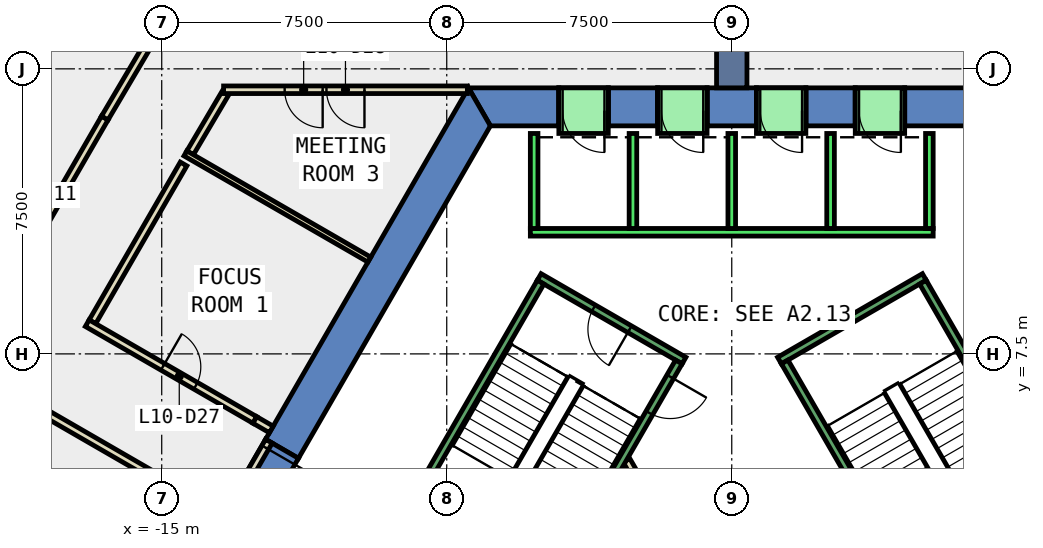
"""IFC4 building model, lengths in metres.
Left out: names, types, materials, properties, quantities, classifications, styles, units other than length and angle.
Written with IfcOpenShell. Run it as: python <this file> out.ifc"""

import sys

from ifc_helpers import new_model, si_unit, direction, frame, frame_2d, origin, place, context, subcontext, project, spatial, polyline, rectangle, outline, extrude, element, fill, save


model = new_model("IFC4")
c1 = context("Model", 3, precision=1e-05, world=origin(), true_north=direction((0.0, 1.0)))
c2 = subcontext(c1, "Body", "Model", "MODEL_VIEW")
j1 = project(units=[si_unit("LENGTHUNIT", "METRE"), si_unit("PLANEANGLEUNIT", "RADIAN")], contexts=[c1])
p1 = place(None, origin())
s1 = spatial("IfcSite", under=j1, at=p1, CompositionType="ELEMENT")
p2 = place(p1, origin())
s2 = spatial("IfcBuilding", under=s1, at=p2, CompositionType="ELEMENT")
p3 = place(p2, frame((0.0, 0.0, 51.8)))
s3 = spatial("IfcBuildingStorey", under=s2, at=p3, CompositionType="ELEMENT", Elevation=51.8)
p4 = place(p3, frame((0.0, 0.0, -0.4)))
e1 = element("IfcWall", 1, at=p4, inside=s3, PredefinedType="SHEAR", context=c2, shape_type="SweptSolid", body=[
    extrude(outline(polyline([(4.55, 14.5), (4.55, 13.5), (6.351, 13.5), (6.928, 14.5), (4.55, 14.5)])), origin(), (0.0, 0.0, 1.0), 4.2),
])
p5 = place(p3, frame((0.0, 0.0, -0.4)))
e2 = element("IfcWall", 2, at=p5, inside=s3, PredefinedType="SHEAR", context=c2, shape_type="SweptSolid", body=[
    extrude(outline(polyline([(1.95, 14.5), (1.95, 13.5), (3.25, 13.5), (3.25, 14.5), (1.95, 14.5)])), origin(), (0.0, 0.0, 1.0), 4.2),
])
p6 = place(p3, frame((0.0, 0.0, -0.4)))
e3 = element("IfcWall", 3, at=p6, inside=s3, PredefinedType="SHEAR", context=c2, shape_type="SweptSolid", body=[
    extrude(outline(polyline([(-0.65, 14.5), (-0.65, 13.5), (0.65, 13.5), (0.65, 14.5), (-0.65, 14.5)])), origin(), (0.0, 0.0, 1.0), 4.2),
])
p7 = place(p3, frame((0.0, 0.0, -0.4)))
e4 = element("IfcWall", 4, at=p7, inside=s3, PredefinedType="SHEAR", context=c2, shape_type="SweptSolid", body=[
    extrude(outline(polyline([(-3.25, 14.5), (-3.25, 13.5), (-1.95, 13.5), (-1.95, 14.5), (-3.25, 14.5)])), origin(), (0.0, 0.0, 1.0), 4.2),
])
p8 = place(p3, frame((0.0, 0.0, -0.4)))
e5 = element("IfcWall", 5, at=p8, inside=s3, PredefinedType="SHEAR", context=c2, shape_type="SweptSolid", body=[
    extrude(outline(polyline([(-4.55, 13.5), (-4.55, 14.5), (-6.928, 14.5), (-6.351, 13.5), (-4.55, 13.5)])), origin(), (0.0, 0.0, 1.0), 4.2),
])
p9 = place(p3, frame((0.0, 0.0, 3.6)))
e6 = element("IfcWall", 6, at=p9, inside=s3, PredefinedType="SHEAR", context=c2, shape_type="SweptSolid", body=[
    extrude(outline(polyline([(3.25, 14.5), (3.25, 13.5), (4.55, 13.5), (4.55, 14.5), (3.25, 14.5)])), origin(), (0.0, 0.0, 1.0), 0.2),
])
p10 = place(p3, frame((0.0, 0.0, 3.6)))
e7 = element("IfcWall", 7, at=p10, inside=s3, PredefinedType="SHEAR", context=c2, shape_type="SweptSolid", body=[
    extrude(outline(polyline([(0.65, 14.5), (0.65, 13.5), (1.95, 13.5), (1.95, 14.5), (0.65, 14.5)])), origin(), (0.0, 0.0, 1.0), 0.2),
])
p11 = place(p3, frame((0.0, 0.0, 3.6)))
e8 = element("IfcWall", 8, at=p11, inside=s3, PredefinedType="SHEAR", context=c2, shape_type="SweptSolid", body=[
    extrude(outline(polyline([(-1.95, 14.5), (-1.95, 13.5), (-0.65, 13.5), (-0.65, 14.5), (-1.95, 14.5)])), origin(), (0.0, 0.0, 1.0), 0.2),
])
p12 = place(p3, frame((0.0, 0.0, 3.6)))
e9 = element("IfcWall", 9, at=p12, inside=s3, PredefinedType="SHEAR", context=c2, shape_type="SweptSolid", body=[
    extrude(outline(polyline([(-4.55, 14.5), (-4.55, 13.5), (-3.25, 13.5), (-3.25, 14.5), (-4.55, 14.5)])), origin(), (0.0, 0.0, 1.0), 0.2),
])
p13 = place(p3, frame((0.0, 0.0, -0.4)))
e10 = element("IfcWall", 10, at=p13, inside=s3, PredefinedType="SHEAR", context=c2, shape_type="SweptSolid", body=[
    extrude(outline(polyline([(-12.267, 5.252), (-11.402, 4.752), (-6.351, 13.5), (-6.928, 14.5), (-12.267, 5.252)])), origin(), (0.0, 0.0, 1.0), 4.2),
])
p14 = place(p3, frame((0.0, 0.0, 3.6)))
e11 = element("IfcWall", 11, at=p14, inside=s3, PredefinedType="SHEAR", context=c2, shape_type="SweptSolid", body=[
    extrude(outline(polyline([(-13.267, 3.52), (-12.402, 3.02), (-11.402, 4.752), (-12.267, 5.252), (-13.267, 3.52)])), origin(), (0.0, 0.0, 1.0), 0.2),
])
p15 = place(p3, frame((0.0, 14.5, -0.4), z_axis=(0.0, 0.0, 1.0), x_axis=(0.0, 1.0, 0.0)))
e12 = element("IfcWall", 12, at=p15, inside=s3, PredefinedType="SHEAR", context=c2, shape_type="SweptSolid", body=[
    extrude(rectangle(XDim=9.0, YDim=0.8, at=frame_2d((4.5, 0.0))), origin(), (0.0, 0.0, 1.0), 4.2),
])
p16 = place(p3, frame((-14.425, 12.497, 0.0), z_axis=(0.0, 0.0, 1.0), x_axis=(-0.500026519606, -0.866010092142, 0.0)))
e13 = element("IfcWall", 13, at=p16, inside=s3, PredefinedType="PARTITIONING", context=c2, shape_type="SweptSolid", body=[
    extrude(rectangle(XDim=4.796, YDim=0.2, at=frame_2d((2.398, 0.0))), origin(), (0.0, 0.0, 1.0), 3.8),
])
p17 = place(p3, frame((-16.96, 8.308, 0.0), z_axis=(0.0, 0.0, 1.0), x_axis=(0.866018717003, -0.500011581666, 0.0)))
e14 = element("IfcWall", 14, at=p17, inside=s3, PredefinedType="PARTITIONING", context=c2, shape_type="SweptSolid", body=[
    extrude(rectangle(XDim=5.092, YDim=0.2, at=frame_2d((2.546, 0.0))), origin(), (0.0, 0.0, 1.0), 3.8),
])
p18 = place(p17, frame((2.296, 0.0, 0.0)))
e15 = element("IfcOpeningElement", 15, at=p18, cuts=e14, PredefinedType="OPENING", context=c2, shape_type="SweptSolid", body=[
    extrude(rectangle(XDim=1.0, YDim=2.1, at=frame_2d((0.5, 1.05))), frame((0.0, 0.11, 0.0), z_axis=(0.0, -1.0, 0.0), x_axis=(1.0, 0.0, 0.0)), (0.0, 0.0, 1.0), 0.22),
])
p19 = place(p3, frame((-13.323, 14.364, 0.0), z_axis=(0.0, 0.0, 1.0), x_axis=(-0.508274698505, -0.861195001646, 0.0)))
e16 = element("IfcWall", 16, at=p19, inside=s3, PredefinedType="PARTITIONING", context=c2, shape_type="SweptSolid", body=[
    extrude(rectangle(XDim=1.828, YDim=0.2, at=frame_2d((0.914, 0.0))), origin(), (0.0, 0.0, 1.0), 3.8),
])
p20 = place(p3, frame((-20.12, 7.434, 0.0), z_axis=(0.0, 0.0, 1.0), x_axis=(0.500039488902, 0.866002603656, 0.0)))
e17 = element("IfcWall", 17, at=p20, inside=s3, PredefinedType="PARTITIONING", context=c2, shape_type="SweptSolid", body=[
    extrude(rectangle(XDim=7.244, YDim=0.2, at=frame_2d((3.622, 0.0))), origin(), (0.0, 0.0, 1.0), 3.8),
])
p21 = place(p20, frame((3.122, 0.0, 0.0)))
e18 = element("IfcOpeningElement", 18, at=p21, cuts=e17, PredefinedType="OPENING", context=c2, shape_type="SweptSolid", body=[
    extrude(rectangle(XDim=1.0, YDim=2.1, at=frame_2d((0.5, 1.05))), frame((0.0, 0.11, 0.0), z_axis=(0.0, -1.0, 0.0), x_axis=(1.0, 0.0, 0.0)), (0.0, 0.0, 1.0), 0.22),
])
p22 = place(p3, frame((-16.498, 13.707, 0.0), z_axis=(0.0, 0.0, 1.0), x_axis=(0.508471945541, 0.861078556578, 0.0)))
e19 = element("IfcWall", 19, at=p22, inside=s3, PredefinedType="PARTITIONING", context=c2, shape_type="SweptSolid", body=[
    extrude(rectangle(XDim=3.548, YDim=0.2, at=frame_2d((1.774, 0.0))), origin(), (0.0, 0.0, 1.0), 3.8),
])
p23 = place(p3, frame((-14.377, 12.775, 0.0), z_axis=(0.0, 0.0, 1.0), x_axis=(0.866051730117, -0.499954398681, 0.0)))
e20 = element("IfcWall", 20, at=p23, inside=s3, PredefinedType="PARTITIONING", context=c2, shape_type="SweptSolid", body=[
    extrude(rectangle(XDim=5.588, YDim=0.15, at=frame_2d((2.794, 0.0))), origin(), (0.0, 0.0, 1.0), 3.8),
])
p24 = place(p3, frame((-6.957, 14.45, 0.0), z_axis=(0.0, 0.0, 1.0), x_axis=(-1.0, 0.0, 0.0)))
e21 = element("IfcWall", 21, at=p24, inside=s3, PredefinedType="PARTITIONING", context=c2, shape_type="SweptSolid", body=[
    extrude(rectangle(XDim=6.415, YDim=0.2, at=frame_2d((3.208, 0.0))), origin(), (0.0, 0.0, 1.0), 3.8),
])
p25 = place(p24, frame((2.708, 0.0, 0.0)))
e22 = element("IfcOpeningElement", 22, at=p25, cuts=e21, PredefinedType="OPENING", context=c2, shape_type="SweptSolid", body=[
    extrude(rectangle(XDim=1.0, YDim=2.1, at=frame_2d((0.5, 1.05))), frame((0.0, 0.11, 0.0), z_axis=(0.0, -1.0, 0.0), x_axis=(1.0, 0.0, 0.0)), (0.0, 0.0, 1.0), 0.22),
])
p26 = place(p24, frame((3.808, 0.0, 0.0)))
e23 = element("IfcOpeningElement", 23, at=p26, cuts=e21, PredefinedType="OPENING", context=c2, shape_type="SweptSolid", body=[
    extrude(rectangle(XDim=1.0, YDim=2.1, at=frame_2d((0.5, 1.05))), frame((0.0, 0.11, 0.0), z_axis=(0.0, -1.0, 0.0), x_axis=(1.0, 0.0, 0.0)), (0.0, 0.0, 1.0), 0.22),
])
p27 = place(p3, frame((-2.771, 4.7, 0.0), z_axis=(0.0, 0.0, 1.0), x_axis=(0.499969479948, -0.866043023828, 0.0)))
e24 = element("IfcWall", 24, at=p27, inside=s3, PredefinedType="PARTITIONING", context=c2, shape_type="SweptSolid", body=[
    extrude(rectangle(XDim=4.99, YDim=0.2, at=frame_2d((2.495, 0.0))), origin(), (0.0, 0.0, 1.0), 3.8),
])
p28 = place(p27, frame((1.945, 0.0, 0.0)))
e25 = element("IfcOpeningElement", 25, at=p28, cuts=e24, PredefinedType="OPENING", context=c2, shape_type="SweptSolid", body=[
    extrude(rectangle(XDim=1.0, YDim=2.1, at=frame_2d((0.5, 1.05))), frame((0.0, 0.11, 0.0), z_axis=(0.0, -1.0, 0.0), x_axis=(1.0, 0.0, 0.0)), (0.0, 0.0, 1.0), 0.22),
])
p29 = place(p3, frame((-12.18, 5.202, 0.0), z_axis=(0.0, 0.0, 1.0), x_axis=(-0.50002537861, -0.866010750942, 0.0)))
e26 = element("IfcWall", 26, at=p29, inside=s3, PredefinedType="PARTITIONING", context=c2, shape_type="SweptSolid", body=[
    extrude(rectangle(XDim=2.0, YDim=0.2, at=frame_2d((1.0, 0.0))), origin(), (0.0, 0.0, 1.0), 2.4),
])
p30 = place(p29, frame((0.19, 0.0, 0.0)))
e27 = element("IfcOpeningElement", 27, at=p30, cuts=e26, PredefinedType="OPENING", context=c2, shape_type="SweptSolid", body=[
    extrude(rectangle(XDim=1.8, YDim=2.1, at=frame_2d((0.9, 1.05))), frame((0.0, 0.11, 0.0), z_axis=(0.0, -1.0, 0.0), x_axis=(1.0, 0.0, 0.0)), (0.0, 0.0, 1.0), 0.22),
])
p31 = place(p3, frame((-12.55, 5.762, 0.0), z_axis=(0.0, 0.0, 1.0), x_axis=(0.866071776036, -0.499919672301, 0.0)))
e28 = element("IfcWall", 28, at=p31, inside=s3, PredefinedType="PARTITIONING", context=c2, shape_type="SweptSolid", body=[
    extrude(rectangle(XDim=0.5, YDim=0.2, at=frame_2d((0.25, 0.0))), origin(), (0.0, 0.0, 1.0), 2.4),
])
p32 = place(p3, frame((-13.85, 3.51, 0.0), z_axis=(0.0, 0.0, 1.0), x_axis=(-0.865969361037, 0.500097056325, 0.0)))
e29 = element("IfcWall", 29, at=p32, inside=s3, PredefinedType="PARTITIONING", context=c2, shape_type="SweptSolid", body=[
    extrude(rectangle(XDim=4.889, YDim=0.2, at=frame_2d((2.445, 0.0))), origin(), (0.0, 0.0, 1.0), 3.8),
])
p33 = place(p3, frame((5.3, 10.7, 0.0), z_axis=(0.0, 0.0, 1.0), x_axis=(-1.0, 0.0, 0.0)))
e30 = element("IfcWall", 30, at=p33, inside=s3, PredefinedType="STANDARD", context=c2, shape_type="SweptSolid", body=[
    extrude(rectangle(XDim=10.6, YDim=0.2, at=frame_2d((5.3, 0.0))), origin(), (0.0, 0.0, 1.0), 3.8),
])
for number, where, z_axis, x_axis in (
    (31, (5.2, 10.8, 0.0), (0.0, 0.0, 1.0), (0.0, 1.0, 0.0)),
    (32, (2.6, 10.8, 0.0), (0.0, 0.0, 1.0), (0.0, 1.0, 0.0)),
    (33, (0.0, 10.8, 0.0), (0.0, 0.0, 1.0), (0.0, 1.0, 0.0)),
    (34, (-2.6, 10.8, 0.0), (0.0, 0.0, 1.0), (0.0, 1.0, 0.0)),
    (35, (-5.2, 10.8, 0.0), (0.0, 0.0, 1.0), (0.0, 1.0, 0.0)),
):
    element("IfcWall", number, at=place(p3, frame(where, z_axis=z_axis, x_axis=x_axis)), inside=s3, PredefinedType="STANDARD", context=c2, shape_type="SweptSolid", body=[
        extrude(rectangle(XDim=2.5, YDim=0.2, at=frame_2d((1.25, 0.0))), origin(), (0.0, 0.0, 1.0), 3.8),
    ])
p34 = place(p3, frame((4.55, 13.9, 0.0), z_axis=(0.0, 0.0, 1.0), x_axis=(-1.0, 0.0, 0.0)))
e36 = element("IfcWall", 36, at=p34, inside=s3, PredefinedType="STANDARD", context=c2, shape_type="SweptSolid", body=[
    extrude(rectangle(XDim=1.3, YDim=1.2, at=frame_2d((0.65, 0.0))), origin(), (0.0, 0.0, 1.0), 2.4),
])
p35 = place(p34, frame((0.1, 0.0, 0.0)))
e37 = element("IfcOpeningElement", 37, at=p35, cuts=e36, PredefinedType="OPENING", context=c2, shape_type="SweptSolid", body=[
    extrude(rectangle(XDim=1.1, YDim=2.3, at=frame_2d((0.55, 1.15))), frame((0.0, 0.61, 0.0), z_axis=(0.0, -1.0, 0.0), x_axis=(1.0, 0.0, 0.0)), (0.0, 0.0, 1.0), 1.22),
])
p36 = place(p3, frame((1.95, 13.9, 0.0), z_axis=(0.0, 0.0, 1.0), x_axis=(-1.0, 0.0, 0.0)))
e38 = element("IfcWall", 38, at=p36, inside=s3, PredefinedType="STANDARD", context=c2, shape_type="SweptSolid", body=[
    extrude(rectangle(XDim=1.3, YDim=1.2, at=frame_2d((0.65, 0.0))), origin(), (0.0, 0.0, 1.0), 2.4),
])
p37 = place(p36, frame((0.1, 0.0, 0.0)))
e39 = element("IfcOpeningElement", 39, at=p37, cuts=e38, PredefinedType="OPENING", context=c2, shape_type="SweptSolid", body=[
    extrude(rectangle(XDim=1.1, YDim=2.3, at=frame_2d((0.55, 1.15))), frame((0.0, 0.61, 0.0), z_axis=(0.0, -1.0, 0.0), x_axis=(1.0, 0.0, 0.0)), (0.0, 0.0, 1.0), 1.22),
])
p38 = place(p3, frame((-0.65, 13.9, 0.0), z_axis=(0.0, 0.0, 1.0), x_axis=(-1.0, 0.0, 0.0)))
e40 = element("IfcWall", 40, at=p38, inside=s3, PredefinedType="STANDARD", context=c2, shape_type="SweptSolid", body=[
    extrude(rectangle(XDim=1.3, YDim=1.2, at=frame_2d((0.65, 0.0))), origin(), (0.0, 0.0, 1.0), 2.4),
])
p39 = place(p38, frame((0.1, 0.0, 0.0)))
e41 = element("IfcOpeningElement", 41, at=p39, cuts=e40, PredefinedType="OPENING", context=c2, shape_type="SweptSolid", body=[
    extrude(rectangle(XDim=1.1, YDim=2.3, at=frame_2d((0.55, 1.15))), frame((0.0, 0.61, 0.0), z_axis=(0.0, -1.0, 0.0), x_axis=(1.0, 0.0, 0.0)), (0.0, 0.0, 1.0), 1.22),
])
p40 = place(p3, frame((-3.25, 13.9, 0.0), z_axis=(0.0, 0.0, 1.0), x_axis=(-1.0, 0.0, 0.0)))
e42 = element("IfcWall", 42, at=p40, inside=s3, PredefinedType="STANDARD", context=c2, shape_type="SweptSolid", body=[
    extrude(rectangle(XDim=1.3, YDim=1.2, at=frame_2d((0.65, 0.0))), origin(), (0.0, 0.0, 1.0), 2.4),
])
p41 = place(p40, frame((0.1, 0.0, 0.0)))
e43 = element("IfcOpeningElement", 43, at=p41, cuts=e42, PredefinedType="OPENING", context=c2, shape_type="SweptSolid", body=[
    extrude(rectangle(XDim=1.1, YDim=2.3, at=frame_2d((0.55, 1.15))), frame((0.0, 0.61, 0.0), z_axis=(0.0, -1.0, 0.0), x_axis=(1.0, 0.0, 0.0)), (0.0, 0.0, 1.0), 1.22),
])
p42 = place(p3, frame((1.256, 7.324, 0.0), z_axis=(0.0, 0.0, 1.0), x_axis=(0.866046073146, 0.499964197906, 0.0)))
e44 = element("IfcWall", 44, at=p42, inside=s3, PredefinedType="STANDARD", context=c2, shape_type="SweptSolid", body=[
    extrude(rectangle(XDim=4.4, YDim=0.2, at=frame_2d((2.2, 0.0))), origin(), (0.0, 0.0, 1.0), 3.8),
])
p43 = place(p3, frame((4.843, 1.312, 0.0), z_axis=(0.0, 0.0, 1.0), x_axis=(-0.499963383562, 0.866046543262, 0.0)))
e45 = element("IfcWall", 45, at=p43, inside=s3, PredefinedType="STANDARD", context=c2, shape_type="SweptSolid", body=[
    extrude(rectangle(XDim=6.9, YDim=0.2, at=frame_2d((3.45, 0.0))), origin(), (0.0, 0.0, 1.0), 3.8),
])
p44 = place(p43, frame((0.45, 0.0, 0.0)))
e46 = element("IfcOpeningElement", 46, at=p44, cuts=e45, PredefinedType="OPENING", context=c2, shape_type="SweptSolid", body=[
    extrude(rectangle(XDim=1.1, YDim=2.2, at=frame_2d((0.55, 1.1))), frame((0.0, 0.11, 0.0), z_axis=(0.0, -1.0, 0.0), x_axis=(1.0, 0.0, 0.0)), (0.0, 0.0, 1.0), 0.22),
])
p45 = place(p3, frame((8.48, 3.412, 0.0), z_axis=(0.0, 0.0, 1.0), x_axis=(-0.499978703459, 0.866037698999, 0.0)))
e47 = element("IfcWall", 47, at=p45, inside=s3, PredefinedType="STANDARD", context=c2, shape_type="SweptSolid", body=[
    extrude(rectangle(XDim=6.9, YDim=0.2, at=frame_2d((3.45, 0.0))), origin(), (0.0, 0.0, 1.0), 3.8),
])
p46 = place(p3, frame((-1.256, 7.324, 0.0), z_axis=(0.0, 0.0, 1.0), x_axis=(-0.866046073146, 0.499964197906, 0.0)))
e48 = element("IfcWall", 48, at=p46, inside=s3, PredefinedType="STANDARD", context=c2, shape_type="SweptSolid", body=[
    extrude(rectangle(XDim=4.4, YDim=0.2, at=frame_2d((2.2, 0.0))), origin(), (0.0, 0.0, 1.0), 3.8),
])
p47 = place(p46, frame((1.65, 0.0, 0.0)))
e49 = element("IfcOpeningElement", 49, at=p47, cuts=e48, PredefinedType="OPENING", context=c2, shape_type="SweptSolid", body=[
    extrude(rectangle(XDim=1.1, YDim=2.2, at=frame_2d((0.55, 1.1))), frame((0.0, 0.11, 0.0), z_axis=(0.0, -1.0, 0.0), x_axis=(1.0, 0.0, 0.0)), (0.0, 0.0, 1.0), 0.22),
])
p48 = place(p3, frame((-1.393, 7.288, 0.0), z_axis=(0.0, 0.0, 1.0), x_axis=(-0.499963383562, -0.866046543262, 0.0)))
e50 = element("IfcWall", 50, at=p48, inside=s3, PredefinedType="STANDARD", context=c2, shape_type="SweptSolid", body=[
    extrude(rectangle(XDim=6.9, YDim=0.2, at=frame_2d((3.45, 0.0))), origin(), (0.0, 0.0, 1.0), 3.8),
])
p49 = place(p48, frame((0.45, 0.0, 0.0)))
e51 = element("IfcOpeningElement", 51, at=p49, cuts=e50, PredefinedType="OPENING", context=c2, shape_type="SweptSolid", body=[
    extrude(rectangle(XDim=1.1, YDim=2.2, at=frame_2d((0.55, 1.1))), frame((0.0, 0.11, 0.0), z_axis=(0.0, -1.0, 0.0), x_axis=(1.0, 0.0, 0.0)), (0.0, 0.0, 1.0), 0.22),
])
p50 = place(p3, frame((-5.03, 9.388, 0.0), z_axis=(0.0, 0.0, 1.0), x_axis=(-0.499978703459, -0.866037698999, 0.0)))
e52 = element("IfcWall", 52, at=p50, inside=s3, PredefinedType="STANDARD", context=c2, shape_type="SweptSolid", body=[
    extrude(rectangle(XDim=6.9, YDim=0.2, at=frame_2d((3.45, 0.0))), origin(), (0.0, 0.0, 1.0), 3.8),
])
p51 = place(p18, origin())
e53 = element("IfcDoor", 53, at=p51, inside=s3, OperationType="SINGLE_SWING_LEFT", PredefinedType="DOOR", context=c2, shape_type="SweptSolid", body=[
    extrude(rectangle(XDim=1.0, YDim=2.1, at=frame_2d((0.5, 1.05))), frame((0.0, 0.025, 0.0), z_axis=(0.0, -1.0, 0.0), x_axis=(1.0, 0.0, 0.0)), (0.0, 0.0, 1.0), 0.05),
])
fill(e15, e53)
p52 = place(p25, origin())
e54 = element("IfcDoor", 54, at=p52, inside=s3, OperationType="SINGLE_SWING_LEFT", PredefinedType="DOOR", context=c2, shape_type="SweptSolid", body=[
    extrude(rectangle(XDim=1.0, YDim=2.1, at=frame_2d((0.5, 1.05))), frame((0.0, 0.025, 0.0), z_axis=(0.0, -1.0, 0.0), x_axis=(1.0, 0.0, 0.0)), (0.0, 0.0, 1.0), 0.05),
])
fill(e22, e54)
p53 = place(p26, origin())
e55 = element("IfcDoor", 55, at=p53, inside=s3, OperationType="SINGLE_SWING_RIGHT", PredefinedType="DOOR", context=c2, shape_type="SweptSolid", body=[
    extrude(rectangle(XDim=1.0, YDim=2.1, at=frame_2d((0.5, 1.05))), frame((0.0, 0.025, 0.0), z_axis=(0.0, -1.0, 0.0), x_axis=(1.0, 0.0, 0.0)), (0.0, 0.0, 1.0), 0.05),
])
fill(e23, e55)
p54 = place(p30, origin())
e56 = element("IfcDoor", 56, at=p54, inside=s3, OperationType="DOUBLE_DOOR_SINGLE_SWING", PredefinedType="DOOR", context=c2, shape_type="SweptSolid", body=[
    extrude(rectangle(XDim=1.8, YDim=2.1, at=frame_2d((0.9, 1.05))), frame((0.0, 0.025, 0.0), z_axis=(0.0, -1.0, 0.0), x_axis=(1.0, 0.0, 0.0)), (0.0, 0.0, 1.0), 0.05),
])
fill(e27, e56)
p55 = place(p35, origin())
e57 = element("IfcDoor", 57, at=p55, inside=s3, OperationType="SLIDING_TO_LEFT", PredefinedType="DOOR", context=c2, shape_type="SweptSolid", body=[
    extrude(rectangle(XDim=1.1, YDim=2.3, at=frame_2d((0.55, 1.15))), frame((0.0, 0.025, 0.0), z_axis=(0.0, -1.0, 0.0), x_axis=(1.0, 0.0, 0.0)), (0.0, 0.0, 1.0), 0.05),
])
fill(e37, e57)
p56 = place(p37, origin())
e58 = element("IfcDoor", 58, at=p56, inside=s3, OperationType="SLIDING_TO_LEFT", PredefinedType="DOOR", context=c2, shape_type="SweptSolid", body=[
    extrude(rectangle(XDim=1.1, YDim=2.3, at=frame_2d((0.55, 1.15))), frame((0.0, 0.025, 0.0), z_axis=(0.0, -1.0, 0.0), x_axis=(1.0, 0.0, 0.0)), (0.0, 0.0, 1.0), 0.05),
])
fill(e39, e58)
p57 = place(p39, origin())
e59 = element("IfcDoor", 59, at=p57, inside=s3, OperationType="SLIDING_TO_LEFT", PredefinedType="DOOR", context=c2, shape_type="SweptSolid", body=[
    extrude(rectangle(XDim=1.1, YDim=2.3, at=frame_2d((0.55, 1.15))), frame((0.0, 0.025, 0.0), z_axis=(0.0, -1.0, 0.0), x_axis=(1.0, 0.0, 0.0)), (0.0, 0.0, 1.0), 0.05),
])
fill(e41, e59)
p58 = place(p41, origin())
e60 = element("IfcDoor", 60, at=p58, inside=s3, OperationType="SLIDING_TO_LEFT", PredefinedType="DOOR", context=c2, shape_type="SweptSolid", body=[
    extrude(rectangle(XDim=1.1, YDim=2.3, at=frame_2d((0.55, 1.15))), frame((0.0, 0.025, 0.0), z_axis=(0.0, -1.0, 0.0), x_axis=(1.0, 0.0, 0.0)), (0.0, 0.0, 1.0), 0.05),
])
fill(e43, e60)
p59 = place(p49, origin())
e61 = element("IfcDoor", 61, at=p59, inside=s3, OperationType="SINGLE_SWING_LEFT", PredefinedType="DOOR", context=c2, shape_type="SweptSolid", body=[
    extrude(rectangle(XDim=1.1, YDim=2.2, at=frame_2d((0.55, 1.1))), frame((0.0, 0.025, 0.0), z_axis=(0.0, -1.0, 0.0), x_axis=(1.0, 0.0, 0.0)), (0.0, 0.0, 1.0), 0.05),
])
fill(e51, e61)
p60 = place(p47, origin())
e62 = element("IfcDoor", 62, at=p60, inside=s3, OperationType="SINGLE_SWING_LEFT", PredefinedType="DOOR", context=c2, shape_type="SweptSolid", body=[
    extrude(rectangle(XDim=1.1, YDim=2.2, at=frame_2d((0.55, 1.1))), frame((0.0, 0.025, 0.0), z_axis=(0.0, -1.0, 0.0), x_axis=(1.0, 0.0, 0.0)), (0.0, 0.0, 1.0), 0.05),
])
fill(e49, e62)
save(model, sys.argv[1])
